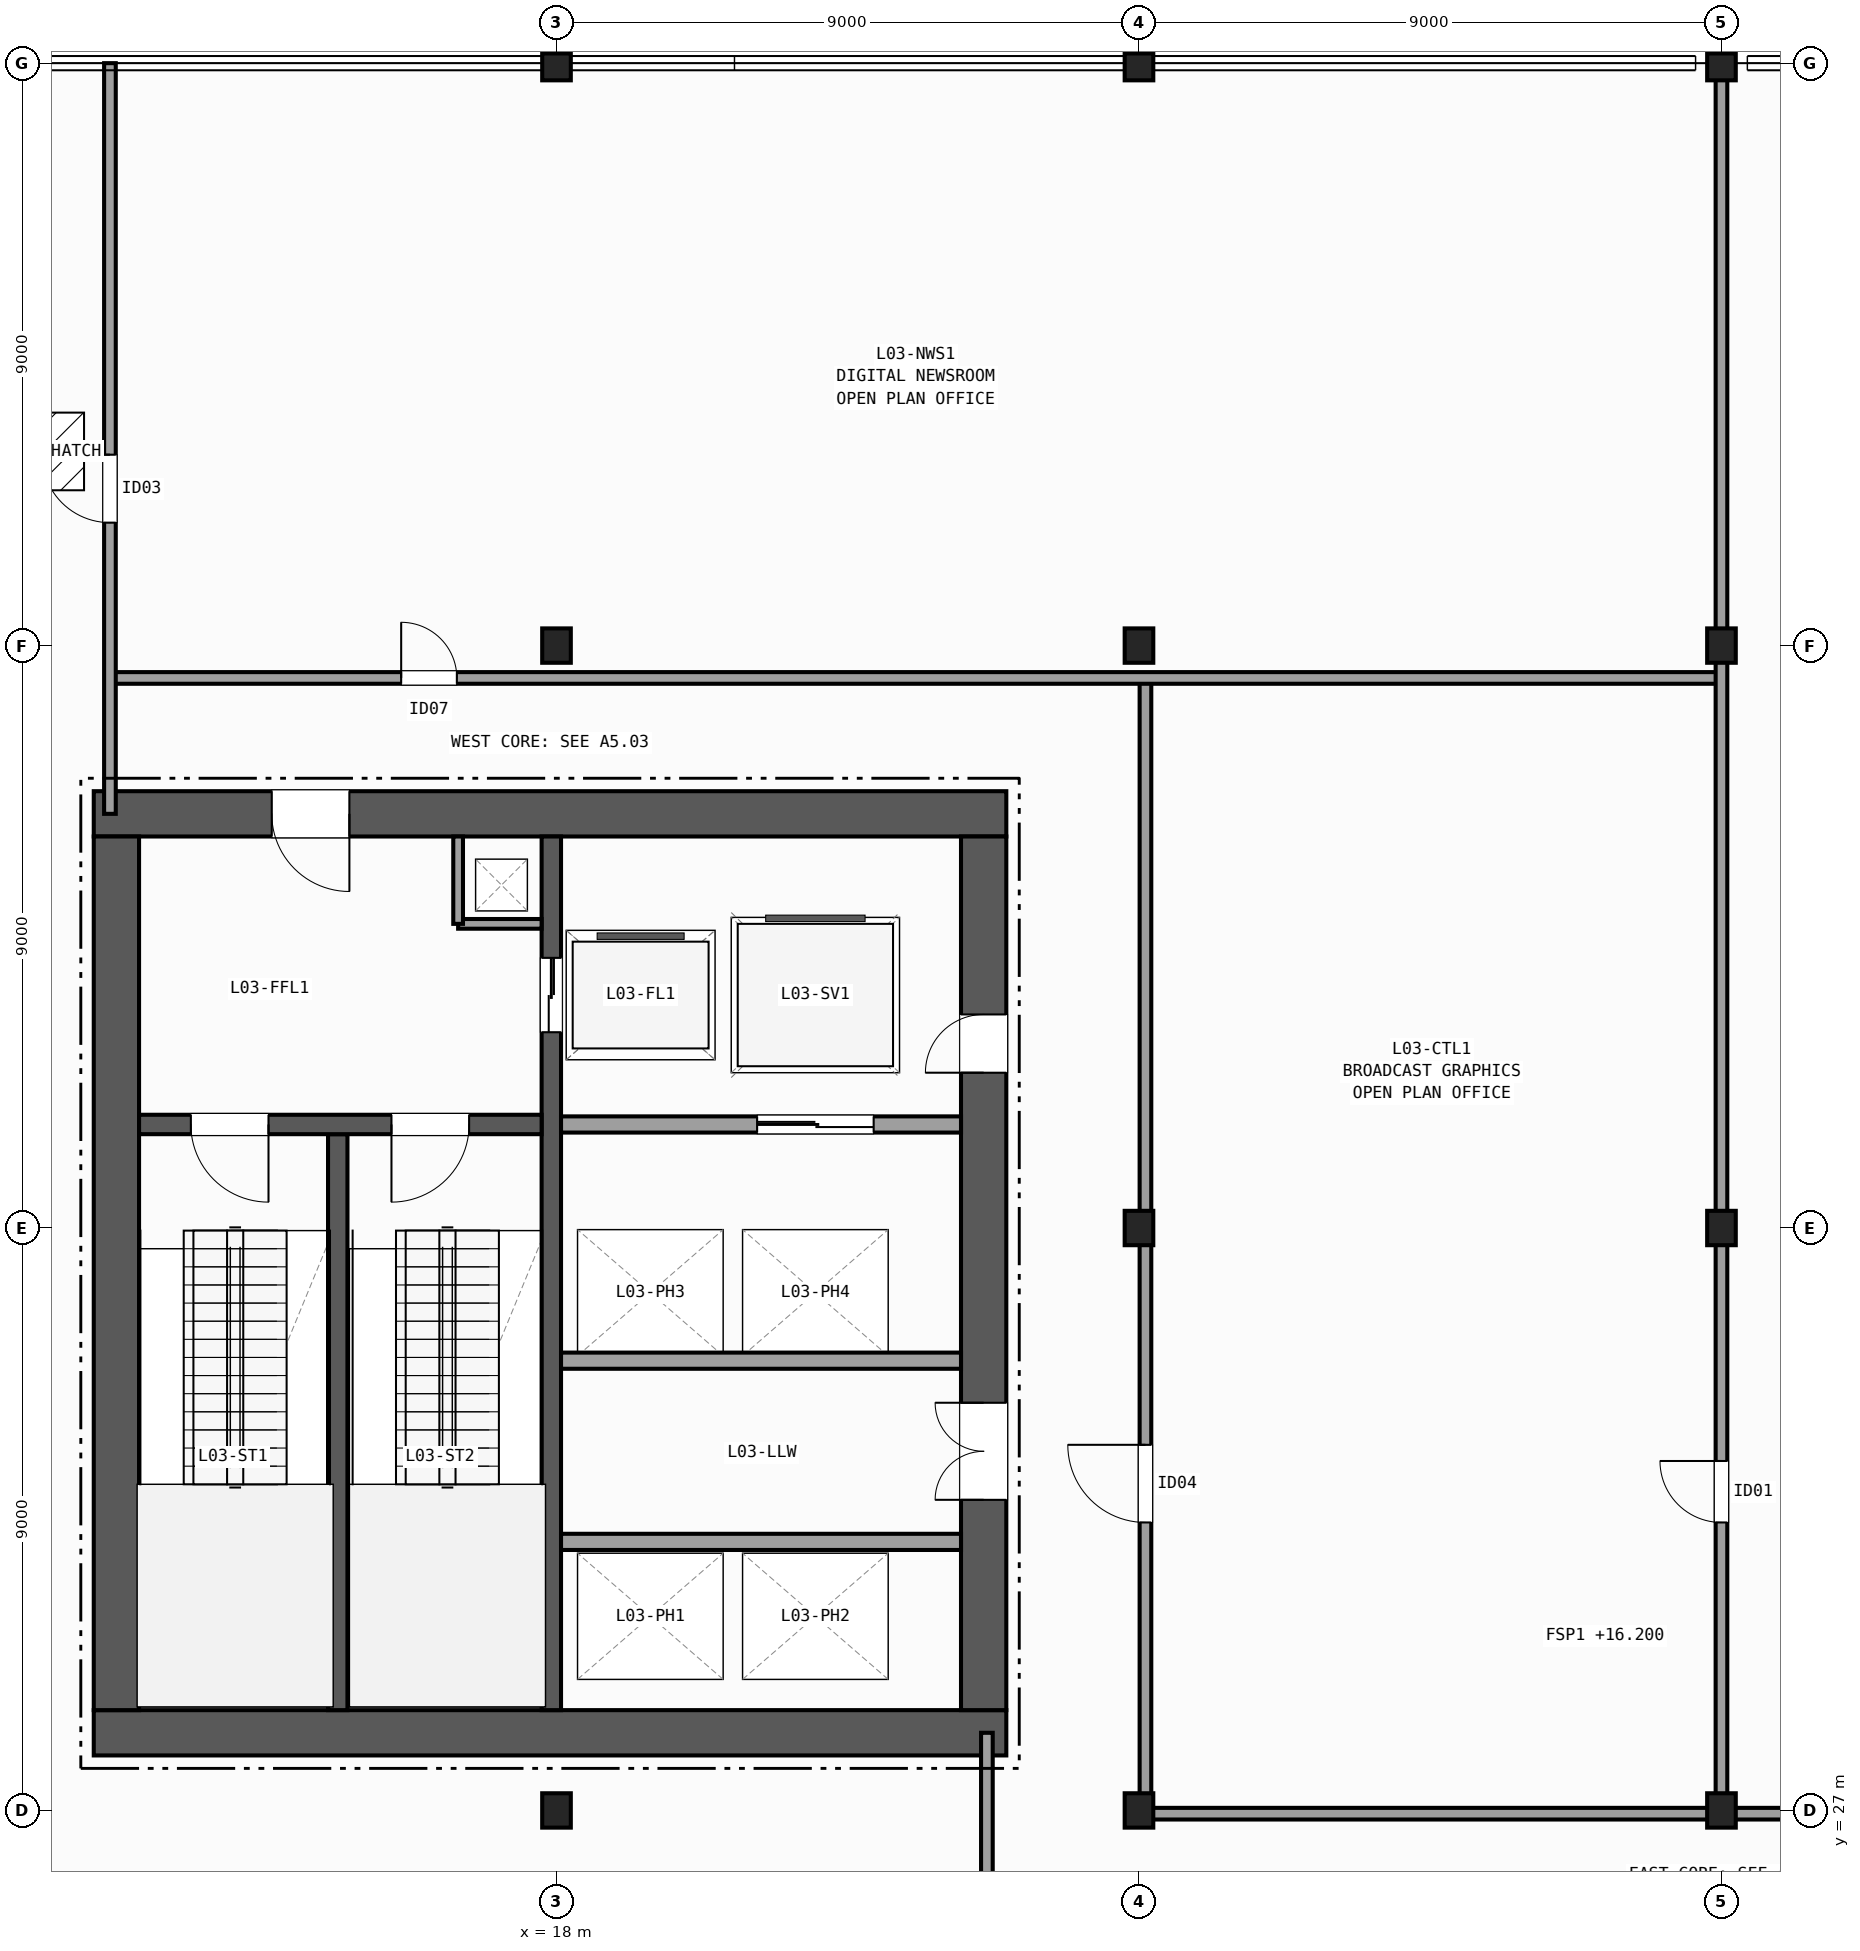
"""IFC4 building model, lengths in metres.
Left out: names, types, materials, properties, quantities, classifications, styles, units other than length and angle.
Written with IfcOpenShell. Run it as: python <this file> out.ifc"""

import sys

from ifc_helpers import new_model, si_unit, direction, frame, frame_2d, origin, origin_2d, place, context, subcontext, project, spatial, rectangle, i_section, extrude, element, fill, save


model = new_model("IFC4")
c1 = context("Model", 3, precision=1e-05, world=origin(), true_north=direction((0.0, 1.0)))
c2 = subcontext(c1, "Body", "Model", "MODEL_VIEW")
j1 = project(units=[si_unit("LENGTHUNIT", "METRE"), si_unit("PLANEANGLEUNIT", "RADIAN")], contexts=[c1])
p1 = place(None, origin())
s1 = spatial("IfcSite", under=j1, at=p1, CompositionType="ELEMENT")
p2 = place(p1, origin())
s2 = spatial("IfcBuilding", under=s1, at=p2, CompositionType="ELEMENT")
p3 = place(p2, frame((0.0, 0.0, 16.2)))
s3 = spatial("IfcBuildingStorey", under=s2, at=p3, CompositionType="ELEMENT", Elevation=16.2)
for number, where, z_axis, x_axis in (
    (1, (18.0, 27.0, 0.0), (0.0, 0.0, 1.0), (1.0, 0.0, 0.0)),
    (2, (18.0, 45.0, 0.0), (0.0, 0.0, 1.0), (1.0, 0.0, 0.0)),
    (3, (18.0, 54.0, 0.0), (0.0, 0.0, 1.0), (1.0, 0.0, 0.0)),
    (4, (27.0, 27.0, 0.0), (0.0, 0.0, 1.0), (1.0, 0.0, 0.0)),
    (5, (27.0, 36.0, 0.0), (0.0, 0.0, 1.0), (1.0, 0.0, 0.0)),
    (6, (27.0, 45.0, 0.0), (0.0, 0.0, 1.0), (1.0, 0.0, 0.0)),
    (7, (27.0, 54.0, 0.0), (0.0, 0.0, 1.0), (1.0, 0.0, 0.0)),
    (8, (36.0, 27.0, 0.0), (0.0, 0.0, 1.0), (1.0, 0.0, 0.0)),
    (9, (36.0, 36.0, 0.0), (0.0, 0.0, 1.0), (1.0, 0.0, 0.0)),
    (10, (36.0, 45.0, 0.0), (0.0, 0.0, 1.0), (1.0, 0.0, 0.0)),
    (11, (36.0, 54.0, 0.0), (0.0, 0.0, 1.0), (1.0, 0.0, 0.0)),
):
    element("IfcColumn", number, at=place(p3, frame(where, z_axis=z_axis, x_axis=x_axis)), inside=s3, PredefinedType="COLUMN", context=c2, shape_type="SweptSolid", body=[
        extrude(i_section(OverallWidth=0.442, OverallDepth=0.531, WebThickness=0.066, FlangeThickness=0.106, FilletRadius=0.015, at=origin_2d()), origin(), (0.0, 0.0, 1.0), 5.0),
    ])
p4 = place(p3, frame((10.85, 28.2, 0.0), z_axis=(0.0, 0.0, 1.0), x_axis=(1.0, 0.0, 0.0)))
e12 = element("IfcWall", 12, at=p4, inside=s3, PredefinedType="SHEAR", context=c2, shape_type="SweptSolid", body=[
    extrude(rectangle(XDim=14.1, YDim=0.7, at=frame_2d((7.05, 0.0))), origin(), (0.0, 0.0, 1.0), 4.68),
])
p5 = place(p3, frame((24.95, 42.4, 0.0), z_axis=(0.0, 0.0, 1.0), x_axis=(-1.0, 0.0, 0.0)))
e13 = element("IfcWall", 13, at=p5, inside=s3, PredefinedType="SHEAR", context=c2, shape_type="SweptSolid", body=[
    extrude(rectangle(XDim=14.1, YDim=0.7, at=frame_2d((7.05, 0.0))), origin(), (0.0, 0.0, 1.0), 4.68),
])
p6 = place(p5, frame((10.15, 0.0, 0.0)))
e14 = element("IfcOpeningElement", 14, at=p6, cuts=e13, PredefinedType="OPENING", context=c2, shape_type="SweptSolid", body=[
    extrude(rectangle(XDim=1.2, YDim=2.15, at=frame_2d((0.6, 1.075))), frame((0.0, 0.36, 0.0), z_axis=(0.0, -1.0, 0.0), x_axis=(1.0, 0.0, 0.0)), (0.0, 0.0, 1.0), 0.72),
])
p7 = place(p3, frame((11.2, 42.05, 0.0), z_axis=(0.0, 0.0, 1.0), x_axis=(0.0, -1.0, 0.0)))
e15 = element("IfcWall", 15, at=p7, inside=s3, PredefinedType="SHEAR", context=c2, shape_type="SweptSolid", body=[
    extrude(rectangle(XDim=13.5, YDim=0.7, at=frame_2d((6.75, 0.0))), origin(), (0.0, 0.0, 1.0), 4.68),
])
p8 = place(p3, frame((24.6, 28.55, 0.0), z_axis=(0.0, 0.0, 1.0), x_axis=(0.0, 1.0, 0.0)))
e16 = element("IfcWall", 16, at=p8, inside=s3, PredefinedType="SHEAR", context=c2, shape_type="SweptSolid", body=[
    extrude(rectangle(XDim=13.5, YDim=0.7, at=frame_2d((6.75, 0.0))), origin(), (0.0, 0.0, 1.0), 4.68),
])
p9 = place(p8, frame((3.25, 0.0, 0.0)))
e17 = element("IfcOpeningElement", 17, at=p9, cuts=e16, PredefinedType="OPENING", context=c2, shape_type="SweptSolid", body=[
    extrude(rectangle(XDim=1.5, YDim=2.2, at=frame_2d((0.75, 1.1))), frame((0.0, 0.36, 0.0), z_axis=(0.0, -1.0, 0.0), x_axis=(1.0, 0.0, 0.0)), (0.0, 0.0, 1.0), 0.72),
])
p10 = place(p8, frame((9.85, 0.0, 0.0)))
e18 = element("IfcOpeningElement", 18, at=p10, cuts=e16, PredefinedType="OPENING", context=c2, shape_type="SweptSolid", body=[
    extrude(rectangle(XDim=0.9, YDim=2.1, at=frame_2d((0.45, 1.05))), frame((0.0, 0.36, 0.0), z_axis=(0.0, -1.0, 0.0), x_axis=(1.0, 0.0, 0.0)), (0.0, 0.0, 1.0), 0.72),
])
p11 = place(p3, frame((14.62, 28.55, 0.0), z_axis=(0.0, 0.0, 1.0), x_axis=(0.0, 1.0, 0.0)))
e19 = element("IfcWall", 19, at=p11, inside=s3, PredefinedType="SHEAR", context=c2, shape_type="SweptSolid", body=[
    extrude(rectangle(XDim=8.9, YDim=0.3, at=frame_2d((4.45, 0.0))), origin(), (0.0, 0.0, 1.0), 4.68),
])
p12 = place(p3, frame((17.92, 42.05, 0.0), z_axis=(0.0, 0.0, 1.0), x_axis=(0.0, -1.0, 0.0)))
e20 = element("IfcWall", 20, at=p12, inside=s3, PredefinedType="SHEAR", context=c2, shape_type="SweptSolid", body=[
    extrude(rectangle(XDim=13.5, YDim=0.3, at=frame_2d((6.75, 0.0))), origin(), (0.0, 0.0, 1.0), 4.68),
])
p13 = place(p12, frame((1.875, 0.0, 0.0)))
e21 = element("IfcOpeningElement", 21, at=p13, cuts=e20, PredefinedType="OPENING", context=c2, shape_type="SweptSolid", body=[
    extrude(rectangle(XDim=1.15, YDim=2.15, at=frame_2d((0.575, 1.075))), frame((0.0, 0.16, 0.0), z_axis=(0.0, -1.0, 0.0), x_axis=(1.0, 0.0, 0.0)), (0.0, 0.0, 1.0), 0.32),
])
p14 = place(p3, frame((17.77, 37.6, 0.0), z_axis=(0.0, 0.0, 1.0), x_axis=(-1.0, 0.0, 0.0)))
e22 = element("IfcWall", 22, at=p14, inside=s3, PredefinedType="SHEAR", context=c2, shape_type="SweptSolid", body=[
    extrude(rectangle(XDim=6.22, YDim=0.3, at=frame_2d((3.11, 0.0))), origin(), (0.0, 0.0, 1.0), 4.68),
])
p15 = place(p14, frame((4.22, 0.0, 0.0)))
e23 = element("IfcOpeningElement", 23, at=p15, cuts=e22, PredefinedType="OPENING", context=c2, shape_type="SweptSolid", body=[
    extrude(rectangle(XDim=1.2, YDim=2.15, at=frame_2d((0.6, 1.075))), frame((0.0, 0.16, 0.0), z_axis=(0.0, -1.0, 0.0), x_axis=(1.0, 0.0, 0.0)), (0.0, 0.0, 1.0), 0.32),
])
p16 = place(p14, frame((1.12, 0.0, 0.0)))
e24 = element("IfcOpeningElement", 24, at=p16, cuts=e22, PredefinedType="OPENING", context=c2, shape_type="SweptSolid", body=[
    extrude(rectangle(XDim=1.2, YDim=2.15, at=frame_2d((0.6, 1.075))), frame((0.0, 0.16, 0.0), z_axis=(0.0, -1.0, 0.0), x_axis=(1.0, 0.0, 0.0)), (0.0, 0.0, 1.0), 0.32),
])
p17 = place(p3, frame((16.48, 40.7, 0.0), z_axis=(0.0, 0.0, 1.0), x_axis=(1.0, 0.0, 0.0)))
e25 = element("IfcWall", 25, at=p17, inside=s3, PredefinedType="PARTITIONING", context=c2, shape_type="SweptSolid", body=[
    extrude(rectangle(XDim=1.29, YDim=0.15, at=frame_2d((0.645, 0.0))), origin(), (0.0, 0.0, 1.0), 4.68),
])
p18 = place(p3, frame((16.48, 40.7, 0.0), z_axis=(0.0, 0.0, 1.0), x_axis=(0.0, 1.0, 0.0)))
e26 = element("IfcWall", 26, at=p18, inside=s3, PredefinedType="PARTITIONING", context=c2, shape_type="SweptSolid", body=[
    extrude(rectangle(XDim=1.35, YDim=0.15, at=frame_2d((0.675, 0.0))), origin(), (0.0, 0.0, 1.0), 4.68),
])
p19 = place(p3, frame((18.07, 37.6, 0.0), z_axis=(0.0, 0.0, 1.0), x_axis=(1.0, 0.0, 0.0)))
e27 = element("IfcWall", 27, at=p19, inside=s3, PredefinedType="PARTITIONING", context=c2, shape_type="SweptSolid", body=[
    extrude(rectangle(XDim=6.18, YDim=0.25, at=frame_2d((3.09, 0.0))), origin(), (0.0, 0.0, 1.0), 4.68),
])
p20 = place(p19, frame((3.03, 0.0, 0.0)))
e28 = element("IfcOpeningElement", 28, at=p20, cuts=e27, PredefinedType="OPENING", context=c2, shape_type="SweptSolid", body=[
    extrude(rectangle(XDim=1.8, YDim=2.3, at=frame_2d((0.9, 1.15))), frame((0.0, 0.135, 0.0), z_axis=(0.0, -1.0, 0.0), x_axis=(1.0, 0.0, 0.0)), (0.0, 0.0, 1.0), 0.27),
])
for number, where, z_axis, x_axis in (
    (29, (18.07, 31.15, 0.0), (0.0, 0.0, 1.0), (1.0, 0.0, 0.0)),
    (30, (24.25, 33.95, 0.0), (0.0, 0.0, 1.0), (-1.0, 0.0, 0.0)),
):
    element("IfcWall", number, at=place(p3, frame(where, z_axis=z_axis, x_axis=x_axis)), inside=s3, PredefinedType="PARTITIONING", context=c2, shape_type="SweptSolid", body=[
        extrude(rectangle(XDim=6.18, YDim=0.25, at=frame_2d((3.09, 0.0))), origin(), (0.0, 0.0, 1.0), 4.68),
    ])
p21 = place(p3, frame((24.65, 5.4, 0.0), z_axis=(0.0, 0.0, 1.0), x_axis=(0.0, 1.0, 0.0)))
e31 = element("IfcWall", 31, at=p21, inside=s3, PredefinedType="PARTITIONING", context=c2, shape_type="SweptSolid", body=[
    extrude(rectangle(XDim=22.8, YDim=0.18, at=frame_2d((11.4, 0.0))), origin(), (0.0, 0.0, 1.0), 3.712),
])
p22 = place(p21, frame((8.6, 0.0, 0.0)))
e32 = element("IfcOpeningElement", 32, at=p22, cuts=e31, PredefinedType="OPENING", context=c2, shape_type="SweptSolid", body=[
    extrude(rectangle(XDim=1.4, YDim=2.15, at=frame_2d((0.7, 1.075))), frame((0.0, 0.1, 0.0), z_axis=(0.0, -1.0, 0.0), x_axis=(1.0, 0.0, 0.0)), (0.0, 0.0, 1.0), 0.2),
])
p23 = place(p3, frame((27.1, 26.95, 0.0), z_axis=(0.0, 0.0, 1.0), x_axis=(1.0, 0.0, 0.0)))
e33 = element("IfcWall", 33, at=p23, inside=s3, PredefinedType="PARTITIONING", context=c2, shape_type="SweptSolid", body=[
    extrude(rectangle(XDim=35.9, YDim=0.18, at=frame_2d((17.95, 0.0))), origin(), (0.0, 0.0, 1.0), 3.733),
])
p24 = place(p3, frame((27.1, 26.95, 0.0), z_axis=(0.0, 0.0, 1.0), x_axis=(0.0, 1.0, 0.0)))
e34 = element("IfcWall", 34, at=p24, inside=s3, PredefinedType="PARTITIONING", context=c2, shape_type="SweptSolid", body=[
    extrude(rectangle(XDim=17.55, YDim=0.18, at=frame_2d((8.775, 0.0))), origin(), (0.0, 0.0, 1.0), 3.733),
])
p25 = place(p24, frame((4.5, 0.0, 0.0)))
e35 = element("IfcOpeningElement", 35, at=p25, cuts=e34, PredefinedType="OPENING", context=c2, shape_type="SweptSolid", body=[
    extrude(rectangle(XDim=1.2, YDim=2.15, at=frame_2d((0.6, 1.075))), frame((0.0, 0.1, 0.0), z_axis=(0.0, -1.0, 0.0), x_axis=(1.0, 0.0, 0.0)), (0.0, 0.0, 1.0), 0.2),
])
p26 = place(p3, frame((11.1, 44.5, 0.0), z_axis=(0.0, 0.0, 1.0), x_axis=(1.0, 0.0, 0.0)))
e36 = element("IfcWall", 36, at=p26, inside=s3, PredefinedType="PARTITIONING", context=c2, shape_type="SweptSolid", body=[
    extrude(rectangle(XDim=24.9, YDim=0.18, at=frame_2d((12.45, 0.0))), origin(), (0.0, 0.0, 1.0), 3.805),
])
p27 = place(p26, frame((4.5, 0.0, 0.0)))
e37 = element("IfcOpeningElement", 37, at=p27, cuts=e36, PredefinedType="OPENING", context=c2, shape_type="SweptSolid", body=[
    extrude(rectangle(XDim=0.86, YDim=2.05, at=frame_2d((0.43, 1.025))), frame((0.0, 0.1, 0.0), z_axis=(0.0, -1.0, 0.0), x_axis=(1.0, 0.0, 0.0)), (0.0, 0.0, 1.0), 0.2),
])
p28 = place(p3, frame((36.0, 26.95, 0.0), z_axis=(0.0, 0.0, 1.0), x_axis=(0.0, 1.0, 0.0)))
e38 = element("IfcWall", 38, at=p28, inside=s3, PredefinedType="PARTITIONING", context=c2, shape_type="SweptSolid", body=[
    extrude(rectangle(XDim=27.05, YDim=0.18, at=frame_2d((13.525, 0.0))), origin(), (0.0, 0.0, 1.0), 3.733),
])
p29 = place(p28, frame((4.5, 0.0, 0.0)))
e39 = element("IfcOpeningElement", 39, at=p29, cuts=e38, PredefinedType="OPENING", context=c2, shape_type="SweptSolid", body=[
    extrude(rectangle(XDim=0.95, YDim=2.1, at=frame_2d((0.475, 1.05))), frame((0.0, 0.1, 0.0), z_axis=(0.0, -1.0, 0.0), x_axis=(1.0, 0.0, 0.0)), (0.0, 0.0, 1.0), 0.2),
])
p30 = place(p3, frame((11.1, 42.4, 0.0), z_axis=(0.0, 0.0, 1.0), x_axis=(0.0, 1.0, 0.0)))
e40 = element("IfcWall", 40, at=p30, inside=s3, PredefinedType="PARTITIONING", context=c2, shape_type="SweptSolid", body=[
    extrude(rectangle(XDim=11.6, YDim=0.18, at=frame_2d((5.8, 0.0))), origin(), (0.0, 0.0, 1.0), 3.733),
])
p31 = place(p30, frame((4.5, 0.0, 0.0)))
e41 = element("IfcOpeningElement", 41, at=p31, cuts=e40, PredefinedType="OPENING", context=c2, shape_type="SweptSolid", body=[
    extrude(rectangle(XDim=1.05, YDim=2.15, at=frame_2d((0.525, 1.075))), frame((0.0, 0.1, 0.0), z_axis=(0.0, -1.0, 0.0), x_axis=(1.0, 0.0, 0.0)), (0.0, 0.0, 1.0), 0.2),
])
p32 = place(p3, frame((0.0, 0.0, -0.32)))
p33 = place(p32, frame((10.2, 48.0, 0.0)))
p34 = place(p33, frame((0.0, 0.0, 0.27)))
e42 = element("IfcDoor", 42, at=p34, inside=s3, OperationType="SINGLE_SWING_LEFT", PredefinedType="TRAPDOOR", context=c2, shape_type="SweptSolid", body=[
    extrude(rectangle(XDim=1.0, YDim=1.2, at=origin_2d()), origin(), (0.0, 0.0, 1.0), 0.05),
])
p35 = place(p15, origin())
e43 = element("IfcDoor", 43, at=p35, inside=s3, OperationType="SINGLE_SWING_LEFT", PredefinedType="DOOR", context=c2, shape_type="SweptSolid", body=[
    extrude(rectangle(XDim=1.2, YDim=2.15, at=frame_2d((0.6, 1.075))), frame((0.0, 0.025, 0.0), z_axis=(0.0, -1.0, 0.0), x_axis=(1.0, 0.0, 0.0)), (0.0, 0.0, 1.0), 0.05),
])
fill(e23, e43)
p36 = place(p16, origin())
e44 = element("IfcDoor", 44, at=p36, inside=s3, OperationType="SINGLE_SWING_RIGHT", PredefinedType="DOOR", context=c2, shape_type="SweptSolid", body=[
    extrude(rectangle(XDim=1.2, YDim=2.15, at=frame_2d((0.6, 1.075))), frame((0.0, 0.025, 0.0), z_axis=(0.0, -1.0, 0.0), x_axis=(1.0, 0.0, 0.0)), (0.0, 0.0, 1.0), 0.05),
])
fill(e24, e44)
p37 = place(p9, origin())
e45 = element("IfcDoor", 45, at=p37, inside=s3, OperationType="DOUBLE_DOOR_SINGLE_SWING", PredefinedType="DOOR", context=c2, shape_type="SweptSolid", body=[
    extrude(rectangle(XDim=1.5, YDim=2.2, at=frame_2d((0.75, 1.1))), frame((0.0, 0.025, 0.0), z_axis=(0.0, -1.0, 0.0), x_axis=(1.0, 0.0, 0.0)), (0.0, 0.0, 1.0), 0.05),
])
fill(e17, e45)
p38 = place(p6, origin())
e46 = element("IfcDoor", 46, at=p38, inside=s3, OperationType="SINGLE_SWING_LEFT", PredefinedType="DOOR", context=c2, shape_type="SweptSolid", body=[
    extrude(rectangle(XDim=1.2, YDim=2.15, at=frame_2d((0.6, 1.075))), frame((0.0, 0.025, 0.0), z_axis=(0.0, -1.0, 0.0), x_axis=(1.0, 0.0, 0.0)), (0.0, 0.0, 1.0), 0.05),
])
fill(e14, e46)
p39 = place(p10, origin())
e47 = element("IfcDoor", 47, at=p39, inside=s3, OperationType="SINGLE_SWING_LEFT", PredefinedType="DOOR", context=c2, shape_type="SweptSolid", body=[
    extrude(rectangle(XDim=0.9, YDim=2.1, at=frame_2d((0.45, 1.05))), frame((0.0, 0.025, 0.0), z_axis=(0.0, -1.0, 0.0), x_axis=(1.0, 0.0, 0.0)), (0.0, 0.0, 1.0), 0.05),
])
fill(e18, e47)
p40 = place(p13, origin())
e48 = element("IfcDoor", 48, at=p40, inside=s3, OperationType="DOUBLE_DOOR_SLIDING", PredefinedType="DOOR", context=c2, shape_type="SweptSolid", body=[
    extrude(rectangle(XDim=1.15, YDim=2.15, at=frame_2d((0.575, 1.075))), frame((0.0, 0.025, 0.0), z_axis=(0.0, -1.0, 0.0), x_axis=(1.0, 0.0, 0.0)), (0.0, 0.0, 1.0), 0.05),
])
fill(e21, e48)
p41 = place(p20, origin())
e49 = element("IfcDoor", 49, at=p41, inside=s3, OperationType="DOUBLE_DOOR_SLIDING", PredefinedType="DOOR", context=c2, shape_type="SweptSolid", body=[
    extrude(rectangle(XDim=1.8, YDim=2.3, at=frame_2d((0.9, 1.15))), frame((0.0, 0.025, 0.0), z_axis=(0.0, -1.0, 0.0), x_axis=(1.0, 0.0, 0.0)), (0.0, 0.0, 1.0), 0.05),
])
fill(e28, e49)
p42 = place(p25, origin())
e50 = element("IfcDoor", 50, at=p42, inside=s3, OperationType="SINGLE_SWING_RIGHT", PredefinedType="DOOR", context=c2, shape_type="SweptSolid", body=[
    extrude(rectangle(XDim=1.2, YDim=2.15, at=frame_2d((0.6, 1.075))), frame((0.0, 0.025, 0.0), z_axis=(0.0, -1.0, 0.0), x_axis=(1.0, 0.0, 0.0)), (0.0, 0.0, 1.0), 0.05),
])
fill(e35, e50)
p43 = place(p27, origin())
e51 = element("IfcDoor", 51, at=p43, inside=s3, OperationType="SINGLE_SWING_LEFT", PredefinedType="DOOR", context=c2, shape_type="SweptSolid", body=[
    extrude(rectangle(XDim=0.86, YDim=2.05, at=frame_2d((0.43, 1.025))), frame((0.0, 0.025, 0.0), z_axis=(0.0, -1.0, 0.0), x_axis=(1.0, 0.0, 0.0)), (0.0, 0.0, 1.0), 0.05),
])
fill(e37, e51)
p44 = place(p29, origin())
e52 = element("IfcDoor", 52, at=p44, inside=s3, OperationType="SINGLE_SWING_RIGHT", PredefinedType="DOOR", context=c2, shape_type="SweptSolid", body=[
    extrude(rectangle(XDim=0.95, YDim=2.1, at=frame_2d((0.475, 1.05))), frame((0.0, 0.025, 0.0), z_axis=(0.0, -1.0, 0.0), x_axis=(1.0, 0.0, 0.0)), (0.0, 0.0, 1.0), 0.05),
])
fill(e39, e52)
p45 = place(p31, origin())
e53 = element("IfcDoor", 53, at=p45, inside=s3, OperationType="SINGLE_SWING_RIGHT", PredefinedType="DOOR", context=c2, shape_type="SweptSolid", body=[
    extrude(rectangle(XDim=1.05, YDim=2.15, at=frame_2d((0.525, 1.075))), frame((0.0, 0.025, 0.0), z_axis=(0.0, -1.0, 0.0), x_axis=(1.0, 0.0, 0.0)), (0.0, 0.0, 1.0), 0.05),
])
fill(e41, e53)
save(model, sys.argv[1])
